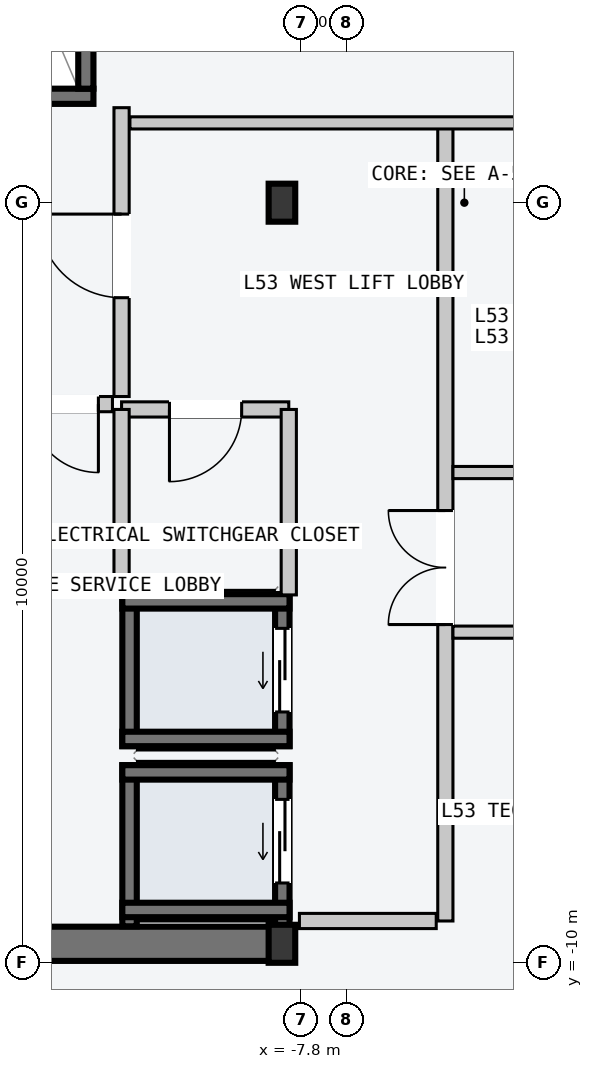
"""IFC4 building model, lengths in metres.
Left out: names, types, materials, properties, quantities, classifications, styles, units other than length and angle.
Written with IfcOpenShell. Run it as: python <this file> out.ifc"""

import sys

from ifc_helpers import new_model, si_unit, direction, frame, frame_2d, origin, origin_2d, place, context, subcontext, project, spatial, rectangle, i_section, extrude, element, fill, save


model = new_model("IFC4")
c1 = context("Model", 3, precision=1e-05, world=origin(), true_north=direction((0.0, 1.0)))
c2 = subcontext(c1, "Body", "Model", "MODEL_VIEW")
j1 = project(units=[si_unit("LENGTHUNIT", "METRE"), si_unit("PLANEANGLEUNIT", "RADIAN")], contexts=[c1])
p1 = place(None, origin())
s1 = spatial("IfcSite", under=j1, at=p1, CompositionType="ELEMENT")
p2 = place(p1, origin())
s2 = spatial("IfcBuilding", under=s1, at=p2, CompositionType="ELEMENT")
p3 = place(p2, frame((0.0, 0.0, 201.9)))
s3 = spatial("IfcBuildingStorey", under=s2, at=p3, CompositionType="ELEMENT", Elevation=201.9)
p4 = place(p3, frame((-14.53, -9.75, -0.2), z_axis=(0.0, 0.0, 1.0), x_axis=(1.0, 0.0, 0.0)))
e1 = element("IfcWall", 1, at=p4, inside=s3, PredefinedType="SHEAR", context=c2, shape_type="SweptSolid", body=[
    extrude(rectangle(XDim=6.46, YDim=0.45, at=frame_2d((3.23, 0.0))), origin(), (0.0, 0.0, 1.0), 3.6),
])
p5 = place(p3, frame((-14.25, 1.4, -0.2), z_axis=(0.0, 0.0, 1.0), x_axis=(1.0, 0.0, 0.0)))
e2 = element("IfcWall", 2, at=p5, inside=s3, PredefinedType="SOLIDWALL", context=c2, shape_type="SweptSolid", body=[
    extrude(rectangle(XDim=3.72, YDim=0.2, at=frame_2d((1.86, 0.0))), origin(), (0.0, 0.0, 1.0), 3.6),
])
p6 = place(p5, frame((1.5, 0.0, 0.2)))
e3 = element("IfcOpeningElement", 3, at=p6, cuts=e2, PredefinedType="OPENING", context=c2, shape_type="SweptSolid", body=[
    extrude(rectangle(XDim=1.12, YDim=2.18, at=frame_2d((0.56, 1.09))), frame((0.0, 0.11, 0.0), z_axis=(0.0, -1.0, 0.0), x_axis=(1.0, 0.0, 0.0)), (0.0, 0.0, 1.0), 0.22),
])
p7 = place(p3, frame((-10.63, 1.5, -0.2), z_axis=(0.0, 0.0, 1.0), x_axis=(0.0, 1.0, 0.0)))
e4 = element("IfcWall", 4, at=p7, inside=s3, PredefinedType="SOLIDWALL", context=c2, shape_type="SweptSolid", body=[
    extrude(rectangle(XDim=7.8, YDim=0.2, at=frame_2d((3.9, 0.0))), origin(), (0.0, 0.0, 1.0), 3.6),
])
for number, where, z_axis, x_axis in (
    (5, (-8.05, -9.75, 0.0), (0.0, 0.0, 1.0), (1.0, 0.0, 0.0)),
    (6, (-8.05, 0.0, 0.0), (0.0, 0.0, 1.0), (1.0, 0.0, 0.0)),
):
    element("IfcColumn", number, at=place(p3, frame(where, z_axis=z_axis, x_axis=x_axis)), inside=s3, PredefinedType="COLUMN", context=c2, shape_type="SweptSolid", body=[
        extrude(i_section(OverallWidth=0.35, OverallDepth=0.5, WebThickness=0.02, FlangeThickness=0.032, at=origin_2d()), origin(), (0.0, 0.0, 1.0), 3.6),
    ])
p8 = place(p3, frame((-8.045, -9.52, -0.2), z_axis=(0.0, 0.0, 1.0), x_axis=(0.0, 1.0, 0.0)))
e7 = element("IfcWall", 7, at=p8, inside=s3, PredefinedType="SOLIDWALL", context=c2, shape_type="SweptSolid", body=[
    extrude(rectangle(XDim=2.12, YDim=0.19, at=frame_2d((1.06, 0.0))), origin(), (0.0, 0.0, 1.0), 3.6),
])
p9 = place(p8, frame((0.57, 0.0, 0.2)))
e8 = element("IfcOpeningElement", 8, at=p9, cuts=e7, PredefinedType="OPENING", context=c2, shape_type="SweptSolid", body=[
    extrude(rectangle(XDim=1.1, YDim=2.2, at=frame_2d((0.55, 1.1))), frame((0.0, 0.105, 0.0), z_axis=(0.0, -1.0, 0.0), x_axis=(1.0, 0.0, 0.0)), (0.0, 0.0, 1.0), 0.21),
])
p10 = place(p3, frame((-10.055, -9.52, -0.2), z_axis=(0.0, 0.0, 1.0), x_axis=(0.0, 1.0, 0.0)))
e9 = element("IfcWall", 9, at=p10, inside=s3, PredefinedType="SOLIDWALL", context=c2, shape_type="SweptSolid", body=[
    extrude(rectangle(XDim=2.12, YDim=0.19, at=frame_2d((1.06, 0.0))), origin(), (0.0, 0.0, 1.0), 3.6),
])
for number, where, z_axis, x_axis in (
    (10, (-10.15, -7.495, -0.2), (0.0, 0.0, 1.0), (1.0, 0.0, 0.0)),
    (11, (-10.15, -9.305, -0.2), (0.0, 0.0, 1.0), (1.0, 0.0, 0.0)),
):
    element("IfcWall", number, at=place(p3, frame(where, z_axis=z_axis, x_axis=x_axis)), inside=s3, PredefinedType="SOLIDWALL", context=c2, shape_type="SweptSolid", body=[
        extrude(rectangle(XDim=2.2, YDim=0.19, at=frame_2d((1.1, 0.0))), origin(), (0.0, 0.0, 1.0), 3.6),
    ])
p11 = place(p3, frame((-8.045, -7.15, -0.2), z_axis=(0.0, 0.0, 1.0), x_axis=(0.0, 1.0, 0.0)))
e12 = element("IfcWall", 12, at=p11, inside=s3, PredefinedType="SOLIDWALL", context=c2, shape_type="SweptSolid", body=[
    extrude(rectangle(XDim=2.0, YDim=0.19, at=frame_2d((1.0, 0.0))), origin(), (0.0, 0.0, 1.0), 3.6),
])
p12 = place(p11, frame((0.45, 0.0, 0.2)))
e13 = element("IfcOpeningElement", 13, at=p12, cuts=e12, PredefinedType="OPENING", context=c2, shape_type="SweptSolid", body=[
    extrude(rectangle(XDim=1.1, YDim=2.2, at=frame_2d((0.55, 1.1))), frame((0.0, 0.105, 0.0), z_axis=(0.0, -1.0, 0.0), x_axis=(1.0, 0.0, 0.0)), (0.0, 0.0, 1.0), 0.21),
])
p13 = place(p3, frame((-10.055, -7.15, -0.2), z_axis=(0.0, 0.0, 1.0), x_axis=(0.0, 1.0, 0.0)))
e14 = element("IfcWall", 14, at=p13, inside=s3, PredefinedType="SOLIDWALL", context=c2, shape_type="SweptSolid", body=[
    extrude(rectangle(XDim=2.0, YDim=0.19, at=frame_2d((1.0, 0.0))), origin(), (0.0, 0.0, 1.0), 3.6),
])
for number, where, z_axis, x_axis in (
    (15, (-10.15, -5.245, -0.2), (0.0, 0.0, 1.0), (1.0, 0.0, 0.0)),
    (16, (-10.15, -7.055, -0.2), (0.0, 0.0, 1.0), (1.0, 0.0, 0.0)),
):
    element("IfcWall", number, at=place(p3, frame(where, z_axis=z_axis, x_axis=x_axis)), inside=s3, PredefinedType="SOLIDWALL", context=c2, shape_type="SweptSolid", body=[
        extrude(rectangle(XDim=2.2, YDim=0.19, at=frame_2d((1.1, 0.0))), origin(), (0.0, 0.0, 1.0), 3.6),
    ])
p14 = place(p3, frame((-5.9, -9.45, 0.0), z_axis=(0.0, 0.0, 1.0), x_axis=(0.0, 1.0, 0.0)))
e17 = element("IfcWall", 17, at=p14, inside=s3, PredefinedType="PARTITIONING", context=c2, shape_type="SweptSolid", body=[
    extrude(rectangle(XDim=10.5, YDim=0.2, at=frame_2d((5.25, 0.0))), origin(), (0.0, 0.0, 1.0), 3.4),
])
p15 = place(p14, frame((3.9, 0.0, 0.0)))
e18 = element("IfcOpeningElement", 18, at=p15, cuts=e17, PredefinedType="OPENING", context=c2, shape_type="SweptSolid", body=[
    extrude(rectangle(XDim=1.5, YDim=2.2, at=frame_2d((0.75, 1.1))), frame((0.0, 0.11, 0.0), z_axis=(0.0, -1.0, 0.0), x_axis=(1.0, 0.0, 0.0)), (0.0, 0.0, 1.0), 0.22),
])
p16 = place(p3, frame((-6.02, -9.45, 0.0), z_axis=(0.0, 0.0, 1.0), x_axis=(-1.0, 0.0, 0.0)))
e19 = element("IfcWall", 19, at=p16, inside=s3, PredefinedType="PARTITIONING", context=c2, shape_type="SweptSolid", body=[
    extrude(rectangle(XDim=1.8, YDim=0.2, at=frame_2d((0.9, 0.0))), origin(), (0.0, 0.0, 1.0), 3.4),
])
p17 = place(p3, frame((-10.16, -2.55, 0.0), z_axis=(0.0, 0.0, 1.0), x_axis=(0.0, 1.0, 0.0)))
e20 = element("IfcWall", 20, at=p17, inside=s3, PredefinedType="PARTITIONING", context=c2, shape_type="SweptSolid", body=[
    extrude(rectangle(XDim=3.8, YDim=0.2, at=frame_2d((1.9, 0.0))), origin(), (0.0, 0.0, 1.0), 3.4),
])
p18 = place(p17, frame((1.3, 0.0, 0.0)))
e21 = element("IfcOpeningElement", 21, at=p18, cuts=e20, PredefinedType="OPENING", context=c2, shape_type="SweptSolid", body=[
    extrude(rectangle(XDim=1.1, YDim=2.15, at=frame_2d((0.55, 1.075))), frame((0.0, 0.11, 0.0), z_axis=(0.0, -1.0, 0.0), x_axis=(1.0, 0.0, 0.0)), (0.0, 0.0, 1.0), 0.22),
])
p19 = place(p3, frame((-10.28, -2.65, 0.0), z_axis=(0.0, 0.0, 1.0), x_axis=(-1.0, 0.0, 0.0)))
e22 = element("IfcWall", 22, at=p19, inside=s3, PredefinedType="PARTITIONING", context=c2, shape_type="SweptSolid", body=[
    extrude(rectangle(XDim=1.27, YDim=0.2, at=frame_2d((0.635, 0.0))), origin(), (0.0, 0.0, 1.0), 3.4),
])
p20 = place(p19, frame((0.185, 0.0, 0.0)))
e23 = element("IfcOpeningElement", 23, at=p20, cuts=e22, PredefinedType="OPENING", context=c2, shape_type="SweptSolid", body=[
    extrude(rectangle(XDim=0.9, YDim=2.15, at=frame_2d((0.45, 1.075))), frame((0.0, 0.11, 0.0), z_axis=(0.0, -1.0, 0.0), x_axis=(1.0, 0.0, 0.0)), (0.0, 0.0, 1.0), 0.22),
])
p21 = place(p3, frame((-7.96, -2.72, 0.0), z_axis=(0.0, 0.0, 1.0), x_axis=(-1.0, 0.0, 0.0)))
e24 = element("IfcWall", 24, at=p21, inside=s3, PredefinedType="PARTITIONING", context=c2, shape_type="SweptSolid", body=[
    extrude(rectangle(XDim=2.2, YDim=0.2, at=frame_2d((1.1, 0.0))), origin(), (0.0, 0.0, 1.0), 3.4),
])
p22 = place(p21, frame((0.62, 0.0, 0.0)))
e25 = element("IfcOpeningElement", 25, at=p22, cuts=e24, PredefinedType="OPENING", context=c2, shape_type="SweptSolid", body=[
    extrude(rectangle(XDim=0.95, YDim=2.1, at=frame_2d((0.475, 1.05))), frame((0.0, 0.11, 0.0), z_axis=(0.0, -1.0, 0.0), x_axis=(1.0, 0.0, 0.0)), (0.0, 0.0, 1.0), 0.22),
])
for number, where, z_axis, x_axis in (
    (26, (-7.96, -5.16, 0.0), (0.0, 0.0, 1.0), (0.0, 1.0, 0.0)),
    (27, (-10.16, -5.16, 0.0), (0.0, 0.0, 1.0), (0.0, 1.0, 0.0)),
):
    element("IfcWall", number, at=place(p3, frame(where, z_axis=z_axis, x_axis=x_axis)), inside=s3, PredefinedType="PARTITIONING", context=c2, shape_type="SweptSolid", body=[
        extrude(rectangle(XDim=2.44, YDim=0.2, at=frame_2d((1.22, 0.0))), origin(), (0.0, 0.0, 1.0), 3.4),
    ])
p23 = place(p3, frame((-10.05, 1.05, 0.0), z_axis=(0.0, 0.0, 1.0), x_axis=(1.0, 0.0, 0.0)))
e28 = element("IfcWall", 28, at=p23, inside=s3, PredefinedType="PARTITIONING", context=c2, shape_type="SweptSolid", body=[
    extrude(rectangle(XDim=8.79, YDim=0.16, at=frame_2d((4.395, 0.0))), origin(), (0.0, 0.0, 1.0), 3.4),
])
for number, where, z_axis, x_axis in (
    (29, (-5.8, -3.55, 0.0), (0.0, 0.0, 1.0), (1.0, 0.0, 0.0)),
    (30, (-5.8, -5.65, 0.0), (0.0, 0.0, 1.0), (1.0, 0.0, 0.0)),
):
    element("IfcWall", number, at=place(p3, frame(where, z_axis=z_axis, x_axis=x_axis)), inside=s3, PredefinedType="PARTITIONING", context=c2, shape_type="SweptSolid", body=[
        extrude(rectangle(XDim=4.54, YDim=0.16, at=frame_2d((2.27, 0.0))), origin(), (0.0, 0.0, 1.0), 3.4),
    ])
p24 = place(p9, origin())
e31 = element("IfcDoor", 31, at=p24, inside=s3, OperationType="SLIDING_TO_LEFT", PredefinedType="DOOR", context=c2, shape_type="SweptSolid", body=[
    extrude(rectangle(XDim=1.1, YDim=2.2, at=frame_2d((0.55, 1.1))), frame((0.0, 0.025, 0.0), z_axis=(0.0, -1.0, 0.0), x_axis=(1.0, 0.0, 0.0)), (0.0, 0.0, 1.0), 0.05),
])
fill(e8, e31)
p25 = place(p12, origin())
e32 = element("IfcDoor", 32, at=p25, inside=s3, OperationType="SLIDING_TO_LEFT", PredefinedType="DOOR", context=c2, shape_type="SweptSolid", body=[
    extrude(rectangle(XDim=1.1, YDim=2.2, at=frame_2d((0.55, 1.1))), frame((0.0, 0.025, 0.0), z_axis=(0.0, -1.0, 0.0), x_axis=(1.0, 0.0, 0.0)), (0.0, 0.0, 1.0), 0.05),
])
fill(e13, e32)
p26 = place(p15, origin())
e33 = element("IfcDoor", 33, at=p26, inside=s3, OperationType="DOUBLE_DOOR_SINGLE_SWING", PredefinedType="DOOR", context=c2, shape_type="SweptSolid", body=[
    extrude(rectangle(XDim=1.5, YDim=2.2, at=frame_2d((0.75, 1.1))), frame((0.0, 0.025, 0.0), z_axis=(0.0, -1.0, 0.0), x_axis=(1.0, 0.0, 0.0)), (0.0, 0.0, 1.0), 0.05),
])
fill(e18, e33)
p27 = place(p18, origin())
e34 = element("IfcDoor", 34, at=p27, inside=s3, OperationType="SINGLE_SWING_RIGHT", PredefinedType="DOOR", context=c2, shape_type="SweptSolid", body=[
    extrude(rectangle(XDim=1.1, YDim=2.15, at=frame_2d((0.55, 1.075))), frame((0.0, 0.025, 0.0), z_axis=(0.0, -1.0, 0.0), x_axis=(1.0, 0.0, 0.0)), (0.0, 0.0, 1.0), 0.05),
])
fill(e21, e34)
p28 = place(p20, origin())
e35 = element("IfcDoor", 35, at=p28, inside=s3, OperationType="SINGLE_SWING_LEFT", PredefinedType="DOOR", context=c2, shape_type="SweptSolid", body=[
    extrude(rectangle(XDim=0.9, YDim=2.15, at=frame_2d((0.45, 1.075))), frame((0.0, 0.025, 0.0), z_axis=(0.0, -1.0, 0.0), x_axis=(1.0, 0.0, 0.0)), (0.0, 0.0, 1.0), 0.05),
])
fill(e23, e35)
p29 = place(p22, origin())
e36 = element("IfcDoor", 36, at=p29, inside=s3, OperationType="SINGLE_SWING_RIGHT", PredefinedType="DOOR", context=c2, shape_type="SweptSolid", body=[
    extrude(rectangle(XDim=0.95, YDim=2.1, at=frame_2d((0.475, 1.05))), frame((0.0, 0.025, 0.0), z_axis=(0.0, -1.0, 0.0), x_axis=(1.0, 0.0, 0.0)), (0.0, 0.0, 1.0), 0.05),
])
fill(e25, e36)
save(model, sys.argv[1])
